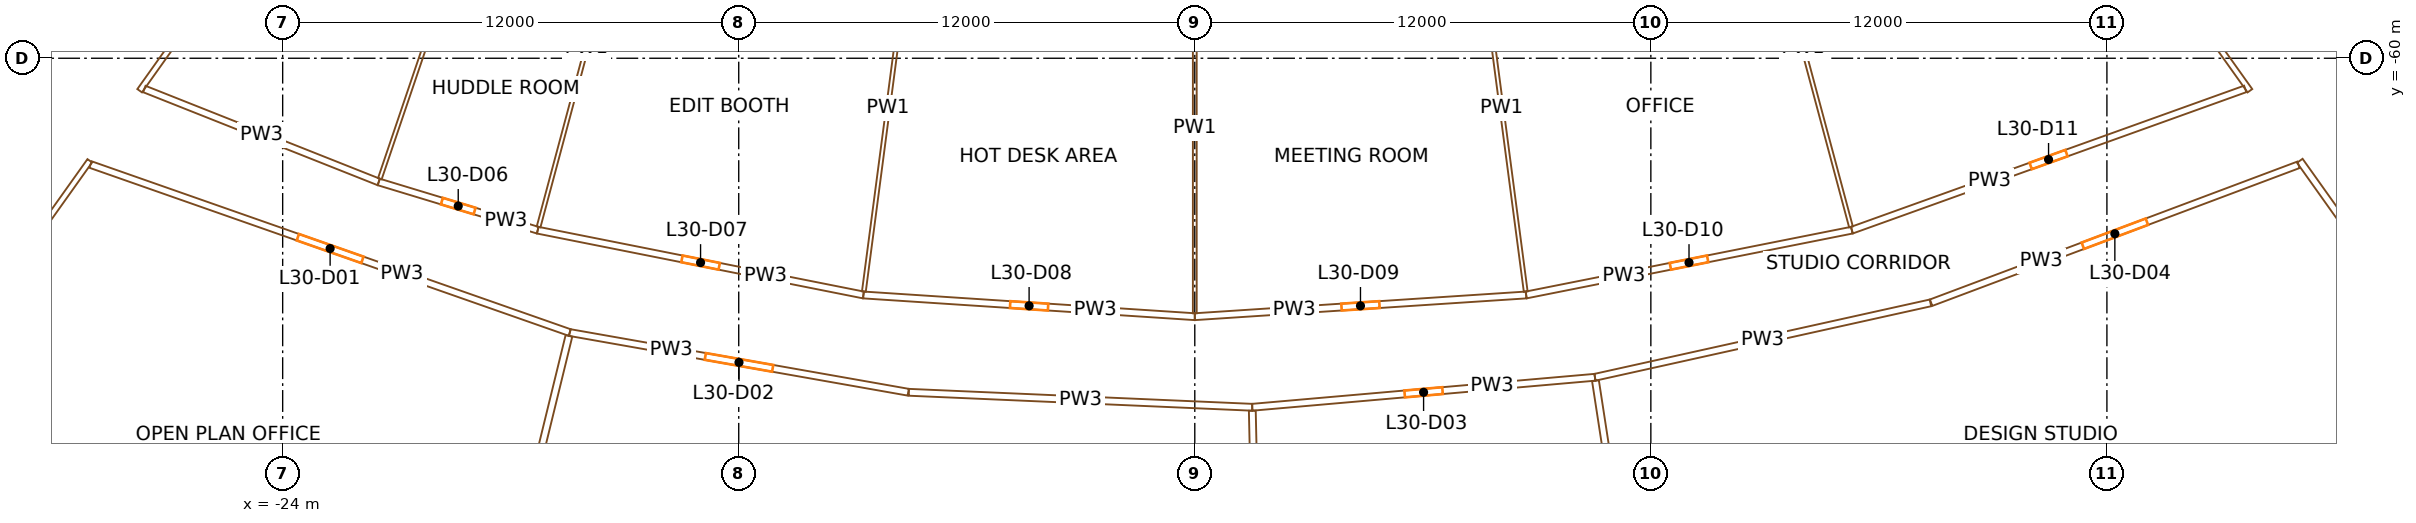
"""IFC4 building model, lengths in metres.
Left out: names, types, materials, properties, quantities, classifications, styles, units other than length and angle.
Written with IfcOpenShell. Run it as: python <this file> out.ifc"""

import sys

from ifc_helpers import new_model, si_unit, direction, frame, frame_2d, origin, place, context, subcontext, project, spatial, rectangle, extrude, element, fill, save


model = new_model("IFC4")
c1 = context("Model", 3, precision=1e-05, world=origin(), true_north=direction((0.0, 1.0)))
c2 = subcontext(c1, "Body", "Model", "MODEL_VIEW")
j1 = project(units=[si_unit("LENGTHUNIT", "METRE"), si_unit("PLANEANGLEUNIT", "RADIAN")], contexts=[c1])
p1 = place(None, origin())
s1 = spatial("IfcSite", under=j1, at=p1, CompositionType="ELEMENT")
p2 = place(p1, origin())
s2 = spatial("IfcBuilding", under=s1, at=p2, CompositionType="ELEMENT")
p3 = place(p2, frame((0.0, 0.0, 132.9)))
s3 = spatial("IfcBuildingStorey", under=s2, at=p3, CompositionType="ELEMENT", Elevation=132.9)
p4 = place(p3, frame((-36.717, -66.337, 0.0), z_axis=(0.0, 0.0, 1.0), x_axis=(0.573577477574, 0.819151315216, 0.0)))
e1 = element("IfcWall", 1, at=p4, inside=s3, PredefinedType="SHEAR", context=c2, shape_type="SweptSolid", body=[
    extrude(rectangle(XDim=14.8, YDim=0.9, at=frame_2d((7.4, 0.0))), origin(), (0.0, 0.0, 1.0), 3.5),
])
p5 = place(p4, frame((6.2, 0.0, 0.0)))
e2 = element("IfcOpeningElement", 2, at=p5, cuts=e1, PredefinedType="OPENING", context=c2, shape_type="SweptSolid", body=[
    extrude(rectangle(XDim=2.4, YDim=2.1, at=frame_2d((1.2, 1.05))), frame((0.0, 0.46, 0.0), z_axis=(0.0, -1.0, 0.0), x_axis=(1.0, 0.0, 0.0)), (0.0, 0.0, 1.0), 0.92),
])
p6 = place(p3, frame((36.717, -66.337, 0.0), z_axis=(0.0, 0.0, 1.0), x_axis=(-0.573577477574, 0.819151315216, 0.0)))
e3 = element("IfcWall", 3, at=p6, inside=s3, PredefinedType="SHEAR", context=c2, shape_type="SweptSolid", body=[
    extrude(rectangle(XDim=14.8, YDim=0.9, at=frame_2d((7.4, 0.0))), origin(), (0.0, 0.0, 1.0), 3.5),
])
p7 = place(p6, frame((6.2, 0.0, 0.0)))
e4 = element("IfcOpeningElement", 4, at=p7, cuts=e3, PredefinedType="OPENING", context=c2, shape_type="SweptSolid", body=[
    extrude(rectangle(XDim=2.4, YDim=2.1, at=frame_2d((1.2, 1.05))), frame((0.0, 0.46, 0.0), z_axis=(0.0, -1.0, 0.0), x_axis=(1.0, 0.0, 0.0)), (0.0, 0.0, 1.0), 0.92),
])
p8 = place(p3, frame((-29.075, -62.698, 0.0), z_axis=(0.0, 0.0, 1.0), x_axis=(-0.58002146853, -0.814601188339, 0.0)))
e5 = element("IfcWall", 5, at=p8, inside=s3, PredefinedType="PARTITIONING", context=c2, shape_type="SweptSolid", body=[
    extrude(rectangle(XDim=10.141, YDim=0.15, at=frame_2d((5.071, 0.0))), origin(), (0.0, 0.0, 1.0), 2.4),
])
p9 = place(p3, frame((-16.446, -67.217, 0.0), z_axis=(0.0, 0.0, 1.0), x_axis=(-0.943684765834, 0.330845980378, 0.0)))
e6 = element("IfcWall", 6, at=p9, inside=s3, PredefinedType="PARTITIONING", context=c2, shape_type="SweptSolid", body=[
    extrude(rectangle(XDim=13.363, YDim=0.18, at=frame_2d((6.682, 0.0))), origin(), (0.0, 0.0, 1.0), 2.4),
])
p10 = place(p9, frame((5.782, 0.0, 0.0)))
e7 = element("IfcOpeningElement", 7, at=p10, cuts=e6, PredefinedType="OPENING", context=c2, shape_type="SweptSolid", body=[
    extrude(rectangle(XDim=1.8, YDim=2.1, at=frame_2d((0.9, 1.05))), frame((0.0, 0.1, 0.0), z_axis=(0.0, -1.0, 0.0), x_axis=(1.0, 0.0, 0.0)), (0.0, 0.0, 1.0), 0.2),
])
p11 = place(p3, frame((-27.641, -60.809, 0.0), z_axis=(0.0, 0.0, 1.0), x_axis=(0.929586380114, -0.368604343308, 0.0)))
e8 = element("IfcWall", 8, at=p11, inside=s3, PredefinedType="PARTITIONING", context=c2, shape_type="SweptSolid", body=[
    extrude(rectangle(XDim=6.636, YDim=0.18, at=frame_2d((3.318, 0.0))), origin(), (0.0, 0.0, 1.0), 2.4),
])
p12 = place(p3, frame((-21.884, -52.598, 0.0), z_axis=(0.0, 0.0, 1.0), x_axis=(-0.580023139251, -0.814599998732, 0.0)))
e9 = element("IfcWall", 9, at=p12, inside=s3, PredefinedType="PARTITIONING", context=c2, shape_type="SweptSolid", body=[
    extrude(rectangle(XDim=10.136, YDim=0.15, at=frame_2d((5.068, 0.0))), origin(), (0.0, 0.0, 1.0), 2.4),
])
p13 = place(p12, frame((4.568, 0.0, 0.0)))
e10 = element("IfcOpeningElement", 10, at=p13, cuts=e9, PredefinedType="OPENING", context=c2, shape_type="SweptSolid", body=[
    extrude(rectangle(XDim=1.0, YDim=2.1, at=frame_2d((0.5, 1.05))), frame((0.0, 0.085, 0.0), z_axis=(0.0, -1.0, 0.0), x_axis=(1.0, 0.0, 0.0)), (0.0, 0.0, 1.0), 0.17),
])
p14 = place(p3, frame((-21.472, -63.255, 0.0), z_axis=(0.0, 0.0, 1.0), x_axis=(0.956933231095, -0.290308097072, 0.0)))
e11 = element("IfcWall", 11, at=p14, inside=s3, PredefinedType="PARTITIONING", context=c2, shape_type="SweptSolid", body=[
    extrude(rectangle(XDim=4.371, YDim=0.18, at=frame_2d((2.186, 0.0))), origin(), (0.0, 0.0, 1.0), 2.4),
])
p15 = place(p14, frame((1.736, 0.0, 0.0)))
e12 = element("IfcOpeningElement", 12, at=p15, cuts=e11, PredefinedType="OPENING", context=c2, shape_type="SweptSolid", body=[
    extrude(rectangle(XDim=0.9, YDim=2.1, at=frame_2d((0.45, 1.05))), frame((0.0, 0.1, 0.0), z_axis=(0.0, -1.0, 0.0), x_axis=(1.0, 0.0, 0.0)), (0.0, 0.0, 1.0), 0.2),
])
p16 = place(p3, frame((-18.763, -76.687, 0.0), z_axis=(0.0, 0.0, 1.0), x_axis=(0.237667739981, 0.971346511484, 0.0)))
e13 = element("IfcWall", 13, at=p16, inside=s3, PredefinedType="PARTITIONING", context=c2, shape_type="SweptSolid", body=[
    extrude(rectangle(XDim=9.659, YDim=0.18, at=frame_2d((4.83, 0.0))), origin(), (0.0, 0.0, 1.0), 2.4),
])
p17 = place(p3, frame((-18.354, -54.07, 0.0), z_axis=(0.0, 0.0, 1.0), x_axis=(-0.321428562801, -0.946933830326, 0.0)))
e14 = element("IfcWall", 14, at=p17, inside=s3, PredefinedType="PARTITIONING", context=c2, shape_type="SweptSolid", body=[
    extrude(rectangle(XDim=9.61, YDim=0.1, at=frame_2d((4.805, 0.0))), origin(), (0.0, 0.0, 1.0), 2.4),
])
p18 = place(p3, frame((-17.289, -64.524, 0.0), z_axis=(0.0, 0.0, 1.0), x_axis=(0.980786466832, -0.195084357342, 0.0)))
e15 = element("IfcWall", 15, at=p18, inside=s3, PredefinedType="PARTITIONING", context=c2, shape_type="SweptSolid", body=[
    extrude(rectangle(XDim=8.738, YDim=0.18, at=frame_2d((4.369, 0.0))), origin(), (0.0, 0.0, 1.0), 2.4),
])
p19 = place(p18, frame((3.869, 0.0, 0.0)))
e16 = element("IfcOpeningElement", 16, at=p19, cuts=e15, PredefinedType="OPENING", context=c2, shape_type="SweptSolid", body=[
    extrude(rectangle(XDim=1.0, YDim=2.1, at=frame_2d((0.5, 1.05))), frame((0.0, 0.1, 0.0), z_axis=(0.0, -1.0, 0.0), x_axis=(1.0, 0.0, 0.0)), (0.0, 0.0, 1.0), 0.2),
])
p20 = place(p3, frame((-7.541, -68.787, 0.0), z_axis=(0.0, 0.0, 1.0), x_axis=(-0.984811812319, 0.173625154619, 0.0)))
e17 = element("IfcWall", 17, at=p20, inside=s3, PredefinedType="PARTITIONING", context=c2, shape_type="SweptSolid", body=[
    extrude(rectangle(XDim=9.043, YDim=0.18, at=frame_2d((4.521, 0.0))), origin(), (0.0, 0.0, 1.0), 2.4),
])
p21 = place(p20, frame((3.621, 0.0, 0.0)))
e18 = element("IfcOpeningElement", 18, at=p21, cuts=e17, PredefinedType="OPENING", context=c2, shape_type="SweptSolid", body=[
    extrude(rectangle(XDim=1.8, YDim=2.1, at=frame_2d((0.9, 1.05))), frame((0.0, 0.1, 0.0), z_axis=(0.0, -1.0, 0.0), x_axis=(1.0, 0.0, 0.0)), (0.0, 0.0, 1.0), 0.2),
])
p22 = place(p3, frame((-14.747, -55.037, 0.0), z_axis=(0.0, 0.0, 1.0), x_axis=(-0.258828880572, -0.965923190829, 0.0)))
e19 = element("IfcWall", 19, at=p22, inside=s3, PredefinedType="PARTITIONING", context=c2, shape_type="SweptSolid", body=[
    extrude(rectangle(XDim=9.731, YDim=0.1, at=frame_2d((4.866, 0.0))), origin(), (0.0, 0.0, 1.0), 2.4),
])
p23 = place(p3, frame((-8.719, -66.229, 0.0), z_axis=(0.0, 0.0, 1.0), x_axis=(0.997858593599, -0.065408158359, 0.0)))
e20 = element("IfcWall", 20, at=p23, inside=s3, PredefinedType="PARTITIONING", context=c2, shape_type="SweptSolid", body=[
    extrude(rectangle(XDim=8.738, YDim=0.18, at=frame_2d((4.369, 0.0))), origin(), (0.0, 0.0, 1.0), 2.4),
])
p24 = place(p23, frame((3.869, 0.0, 0.0)))
e21 = element("IfcOpeningElement", 21, at=p24, cuts=e20, PredefinedType="OPENING", context=c2, shape_type="SweptSolid", body=[
    extrude(rectangle(XDim=1.0, YDim=2.1, at=frame_2d((0.5, 1.05))), frame((0.0, 0.1, 0.0), z_axis=(0.0, -1.0, 0.0), x_axis=(1.0, 0.0, 0.0)), (0.0, 0.0, 1.0), 0.2),
])
p25 = place(p3, frame((-7.523, -68.789, 0.0), z_axis=(0.0, 0.0, 1.0), x_axis=(0.999048962102, -0.043602423354, 0.0)))
e22 = element("IfcWall", 22, at=p25, inside=s3, PredefinedType="PARTITIONING", context=c2, shape_type="SweptSolid", body=[
    extrude(rectangle(XDim=9.043, YDim=0.18, at=frame_2d((4.521, 0.0))), origin(), (0.0, 0.0, 1.0), 2.4),
])
p26 = place(p3, frame((-7.437, -56.491, 0.0), z_axis=(0.0, 0.0, 1.0), x_axis=(-0.130531739513, -0.991444131043, 0.0)))
e23 = element("IfcWall", 23, at=p26, inside=s3, PredefinedType="PARTITIONING", context=c2, shape_type="SweptSolid", body=[
    extrude(rectangle(XDim=9.731, YDim=0.1, at=frame_2d((4.866, 0.0))), origin(), (0.0, 0.0, 1.0), 2.4),
])
p27 = place(p3, frame((0.0, -66.8, 0.0), z_axis=(0.0, 0.0, 1.0), x_axis=(0.997858593599, 0.065408158359, 0.0)))
e24 = element("IfcWall", 24, at=p27, inside=s3, PredefinedType="PARTITIONING", context=c2, shape_type="SweptSolid", body=[
    extrude(rectangle(XDim=8.738, YDim=0.18, at=frame_2d((4.369, 0.0))), origin(), (0.0, 0.0, 1.0), 2.4),
])
p28 = place(p27, frame((3.869, 0.0, 0.0)))
e25 = element("IfcOpeningElement", 25, at=p28, cuts=e24, PredefinedType="OPENING", context=c2, shape_type="SweptSolid", body=[
    extrude(rectangle(XDim=1.0, YDim=2.1, at=frame_2d((0.5, 1.05))), frame((0.0, 0.1, 0.0), z_axis=(0.0, -1.0, 0.0), x_axis=(1.0, 0.0, 0.0)), (0.0, 0.0, 1.0), 0.2),
])
p29 = place(p3, frame((0.0, -56.979, 0.0), z_axis=(0.0, 0.0, 1.0), x_axis=(0.0, -1.0, 0.0)))
e26 = element("IfcWall", 26, at=p29, inside=s3, PredefinedType="PARTITIONING", context=c2, shape_type="SweptSolid", body=[
    extrude(rectangle(XDim=9.731, YDim=0.1, at=frame_2d((4.866, 0.0))), origin(), (0.0, 0.0, 1.0), 2.4),
])
p30 = place(p3, frame((10.529, -68.394, 0.0), z_axis=(0.0, 0.0, 1.0), x_axis=(-0.996190935779, -0.087198735491, 0.0)))
e27 = element("IfcWall", 27, at=p30, inside=s3, PredefinedType="PARTITIONING", context=c2, shape_type="SweptSolid", body=[
    extrude(rectangle(XDim=9.052, YDim=0.18, at=frame_2d((4.526, 0.0))), origin(), (0.0, 0.0, 1.0), 2.4),
])
p31 = place(p30, frame((4.026, 0.0, 0.0)))
e28 = element("IfcOpeningElement", 28, at=p31, cuts=e27, PredefinedType="OPENING", context=c2, shape_type="SweptSolid", body=[
    extrude(rectangle(XDim=1.0, YDim=2.1, at=frame_2d((0.5, 1.05))), frame((0.0, 0.1, 0.0), z_axis=(0.0, -1.0, 0.0), x_axis=(1.0, 0.0, 0.0)), (0.0, 0.0, 1.0), 0.2),
])
p32 = place(p3, frame((1.724, -78.93, 0.0), z_axis=(0.0, 0.0, 1.0), x_axis=(-0.021838346282, 0.999761514878, 0.0)))
e29 = element("IfcWall", 29, at=p32, inside=s3, PredefinedType="PARTITIONING", context=c2, shape_type="SweptSolid", body=[
    extrude(rectangle(XDim=9.659, YDim=0.18, at=frame_2d((4.83, 0.0))), origin(), (0.0, 0.0, 1.0), 2.4),
])
p33 = place(p3, frame((7.437, -56.491, 0.0), z_axis=(0.0, 0.0, 1.0), x_axis=(0.130531739513, -0.991444131043, 0.0)))
e30 = element("IfcWall", 30, at=p33, inside=s3, PredefinedType="PARTITIONING", context=c2, shape_type="SweptSolid", body=[
    extrude(rectangle(XDim=9.731, YDim=0.1, at=frame_2d((4.866, 0.0))), origin(), (0.0, 0.0, 1.0), 2.4),
])
p34 = place(p3, frame((8.719, -66.229, 0.0), z_axis=(0.0, 0.0, 1.0), x_axis=(0.980786466832, 0.195084357342, 0.0)))
e31 = element("IfcWall", 31, at=p34, inside=s3, PredefinedType="PARTITIONING", context=c2, shape_type="SweptSolid", body=[
    extrude(rectangle(XDim=8.738, YDim=0.18, at=frame_2d((4.369, 0.0))), origin(), (0.0, 0.0, 1.0), 2.4),
])
p35 = place(p34, frame((3.869, 0.0, 0.0)))
e32 = element("IfcOpeningElement", 32, at=p35, cuts=e31, PredefinedType="OPENING", context=c2, shape_type="SweptSolid", body=[
    extrude(rectangle(XDim=1.0, YDim=2.1, at=frame_2d((0.5, 1.05))), frame((0.0, 0.1, 0.0), z_axis=(0.0, -1.0, 0.0), x_axis=(1.0, 0.0, 0.0)), (0.0, 0.0, 1.0), 0.2),
])
p36 = place(p3, frame((10.529, -68.394, 0.0), z_axis=(0.0, 0.0, 1.0), x_axis=(0.976293034631, 0.216453021533, 0.0)))
e33 = element("IfcWall", 33, at=p36, inside=s3, PredefinedType="PARTITIONING", context=c2, shape_type="SweptSolid", body=[
    extrude(rectangle(XDim=9.042, YDim=0.18, at=frame_2d((4.521, 0.0))), origin(), (0.0, 0.0, 1.0), 2.4),
])
p37 = place(p3, frame((12.012, -78.03, 0.0), z_axis=(0.0, 0.0, 1.0), x_axis=(-0.152159747281, 0.988355913276, 0.0)))
e34 = element("IfcWall", 34, at=p37, inside=s3, PredefinedType="PARTITIONING", context=c2, shape_type="SweptSolid", body=[
    extrude(rectangle(XDim=9.659, YDim=0.18, at=frame_2d((4.83, 0.0))), origin(), (0.0, 0.0, 1.0), 2.4),
])
p38 = place(p3, frame((14.747, -55.037, 0.0), z_axis=(0.0, 0.0, 1.0), x_axis=(0.258828880572, -0.965923190829, 0.0)))
e35 = element("IfcWall", 35, at=p38, inside=s3, PredefinedType="PARTITIONING", context=c2, shape_type="SweptSolid", body=[
    extrude(rectangle(XDim=9.731, YDim=0.1, at=frame_2d((4.866, 0.0))), origin(), (0.0, 0.0, 1.0), 2.4),
])
p39 = place(p3, frame((17.289, -64.524, 0.0), z_axis=(0.0, 0.0, 1.0), x_axis=(0.941150861554, 0.337986768669, 0.0)))
e36 = element("IfcWall", 36, at=p39, inside=s3, PredefinedType="PARTITIONING", context=c2, shape_type="SweptSolid", body=[
    extrude(rectangle(XDim=10.998, YDim=0.18, at=frame_2d((5.499, 0.0))), origin(), (0.0, 0.0, 1.0), 2.4),
])
p40 = place(p39, frame((4.999, 0.0, 0.0)))
e37 = element("IfcOpeningElement", 37, at=p40, cuts=e36, PredefinedType="OPENING", context=c2, shape_type="SweptSolid", body=[
    extrude(rectangle(XDim=1.0, YDim=2.1, at=frame_2d((0.5, 1.05))), frame((0.0, 0.1, 0.0), z_axis=(0.0, -1.0, 0.0), x_axis=(1.0, 0.0, 0.0)), (0.0, 0.0, 1.0), 0.2),
])
p41 = place(p3, frame((29.043, -62.803, 0.0), z_axis=(0.0, 0.0, 1.0), x_axis=(-0.936226153734, -0.351398049318, 0.0)))
e38 = element("IfcWall", 38, at=p41, inside=s3, PredefinedType="PARTITIONING", context=c2, shape_type="SweptSolid", body=[
    extrude(rectangle(XDim=10.327, YDim=0.18, at=frame_2d((5.164, 0.0))), origin(), (0.0, 0.0, 1.0), 2.4),
])
p42 = place(p41, frame((4.263, 0.0, 0.0)))
e39 = element("IfcOpeningElement", 39, at=p42, cuts=e38, PredefinedType="OPENING", context=c2, shape_type="SweptSolid", body=[
    extrude(rectangle(XDim=1.8, YDim=2.1, at=frame_2d((0.9, 1.05))), frame((0.0, 0.1, 0.0), z_axis=(0.0, -1.0, 0.0), x_axis=(1.0, 0.0, 0.0)), (0.0, 0.0, 1.0), 0.2),
])
p43 = place(p3, frame((21.884, -52.598, 0.0), z_axis=(0.0, 0.0, 1.0), x_axis=(0.580023139251, -0.814599998732, 0.0)))
e40 = element("IfcWall", 40, at=p43, inside=s3, PredefinedType="PARTITIONING", context=c2, shape_type="SweptSolid", body=[
    extrude(rectangle(XDim=10.136, YDim=0.15, at=frame_2d((5.068, 0.0))), origin(), (0.0, 0.0, 1.0), 2.4),
])
p44 = place(p3, frame((29.075, -62.698, 0.0), z_axis=(0.0, 0.0, 1.0), x_axis=(0.58002146853, -0.814601188339, 0.0)))
e41 = element("IfcWall", 41, at=p44, inside=s3, PredefinedType="PARTITIONING", context=c2, shape_type="SweptSolid", body=[
    extrude(rectangle(XDim=10.141, YDim=0.18, at=frame_2d((5.071, 0.0))), origin(), (0.0, 0.0, 1.0), 2.4),
])
p45 = place(p10, origin())
e42 = element("IfcDoor", 42, at=p45, inside=s3, OperationType="DOUBLE_DOOR_SINGLE_SWING", PredefinedType="DOOR", context=c2, shape_type="SweptSolid", body=[
    extrude(rectangle(XDim=1.8, YDim=2.1, at=frame_2d((0.9, 1.05))), frame((0.0, 0.025, 0.0), z_axis=(0.0, -1.0, 0.0), x_axis=(1.0, 0.0, 0.0)), (0.0, 0.0, 1.0), 0.05),
])
fill(e7, e42)
p46 = place(p21, origin())
e43 = element("IfcDoor", 43, at=p46, inside=s3, OperationType="DOUBLE_DOOR_SINGLE_SWING", PredefinedType="DOOR", context=c2, shape_type="SweptSolid", body=[
    extrude(rectangle(XDim=1.8, YDim=2.1, at=frame_2d((0.9, 1.05))), frame((0.0, 0.025, 0.0), z_axis=(0.0, -1.0, 0.0), x_axis=(1.0, 0.0, 0.0)), (0.0, 0.0, 1.0), 0.05),
])
fill(e18, e43)
p47 = place(p31, origin())
e44 = element("IfcDoor", 44, at=p47, inside=s3, OperationType="SINGLE_SWING_RIGHT", PredefinedType="DOOR", context=c2, shape_type="SweptSolid", body=[
    extrude(rectangle(XDim=1.0, YDim=2.1, at=frame_2d((0.5, 1.05))), frame((0.0, 0.025, 0.0), z_axis=(0.0, -1.0, 0.0), x_axis=(1.0, 0.0, 0.0)), (0.0, 0.0, 1.0), 0.05),
])
fill(e28, e44)
p48 = place(p42, origin())
e45 = element("IfcDoor", 45, at=p48, inside=s3, OperationType="DOUBLE_DOOR_SINGLE_SWING", PredefinedType="DOOR", context=c2, shape_type="SweptSolid", body=[
    extrude(rectangle(XDim=1.8, YDim=2.1, at=frame_2d((0.9, 1.05))), frame((0.0, 0.025, 0.0), z_axis=(0.0, -1.0, 0.0), x_axis=(1.0, 0.0, 0.0)), (0.0, 0.0, 1.0), 0.05),
])
fill(e39, e45)
p49 = place(p15, origin())
e46 = element("IfcDoor", 46, at=p49, inside=s3, OperationType="SINGLE_SWING_RIGHT", PredefinedType="DOOR", context=c2, shape_type="SweptSolid", body=[
    extrude(rectangle(XDim=0.9, YDim=2.1, at=frame_2d((0.45, 1.05))), frame((0.0, 0.025, 0.0), z_axis=(0.0, -1.0, 0.0), x_axis=(1.0, 0.0, 0.0)), (0.0, 0.0, 1.0), 0.05),
])
fill(e12, e46)
p50 = place(p19, origin())
e47 = element("IfcDoor", 47, at=p50, inside=s3, OperationType="SINGLE_SWING_RIGHT", PredefinedType="DOOR", context=c2, shape_type="SweptSolid", body=[
    extrude(rectangle(XDim=1.0, YDim=2.1, at=frame_2d((0.5, 1.05))), frame((0.0, 0.025, 0.0), z_axis=(0.0, -1.0, 0.0), x_axis=(1.0, 0.0, 0.0)), (0.0, 0.0, 1.0), 0.05),
])
fill(e16, e47)
p51 = place(p24, origin())
e48 = element("IfcDoor", 48, at=p51, inside=s3, OperationType="SINGLE_SWING_RIGHT", PredefinedType="DOOR", context=c2, shape_type="SweptSolid", body=[
    extrude(rectangle(XDim=1.0, YDim=2.1, at=frame_2d((0.5, 1.05))), frame((0.0, 0.025, 0.0), z_axis=(0.0, -1.0, 0.0), x_axis=(1.0, 0.0, 0.0)), (0.0, 0.0, 1.0), 0.05),
])
fill(e21, e48)
p52 = place(p28, origin())
e49 = element("IfcDoor", 49, at=p52, inside=s3, OperationType="SINGLE_SWING_RIGHT", PredefinedType="DOOR", context=c2, shape_type="SweptSolid", body=[
    extrude(rectangle(XDim=1.0, YDim=2.1, at=frame_2d((0.5, 1.05))), frame((0.0, 0.025, 0.0), z_axis=(0.0, -1.0, 0.0), x_axis=(1.0, 0.0, 0.0)), (0.0, 0.0, 1.0), 0.05),
])
fill(e25, e49)
p53 = place(p35, origin())
e50 = element("IfcDoor", 50, at=p53, inside=s3, OperationType="SINGLE_SWING_RIGHT", PredefinedType="DOOR", context=c2, shape_type="SweptSolid", body=[
    extrude(rectangle(XDim=1.0, YDim=2.1, at=frame_2d((0.5, 1.05))), frame((0.0, 0.025, 0.0), z_axis=(0.0, -1.0, 0.0), x_axis=(1.0, 0.0, 0.0)), (0.0, 0.0, 1.0), 0.05),
])
fill(e32, e50)
p54 = place(p40, origin())
e51 = element("IfcDoor", 51, at=p54, inside=s3, OperationType="SINGLE_SWING_RIGHT", PredefinedType="DOOR", context=c2, shape_type="SweptSolid", body=[
    extrude(rectangle(XDim=1.0, YDim=2.1, at=frame_2d((0.5, 1.05))), frame((0.0, 0.025, 0.0), z_axis=(0.0, -1.0, 0.0), x_axis=(1.0, 0.0, 0.0)), (0.0, 0.0, 1.0), 0.05),
])
fill(e37, e51)
save(model, sys.argv[1])
